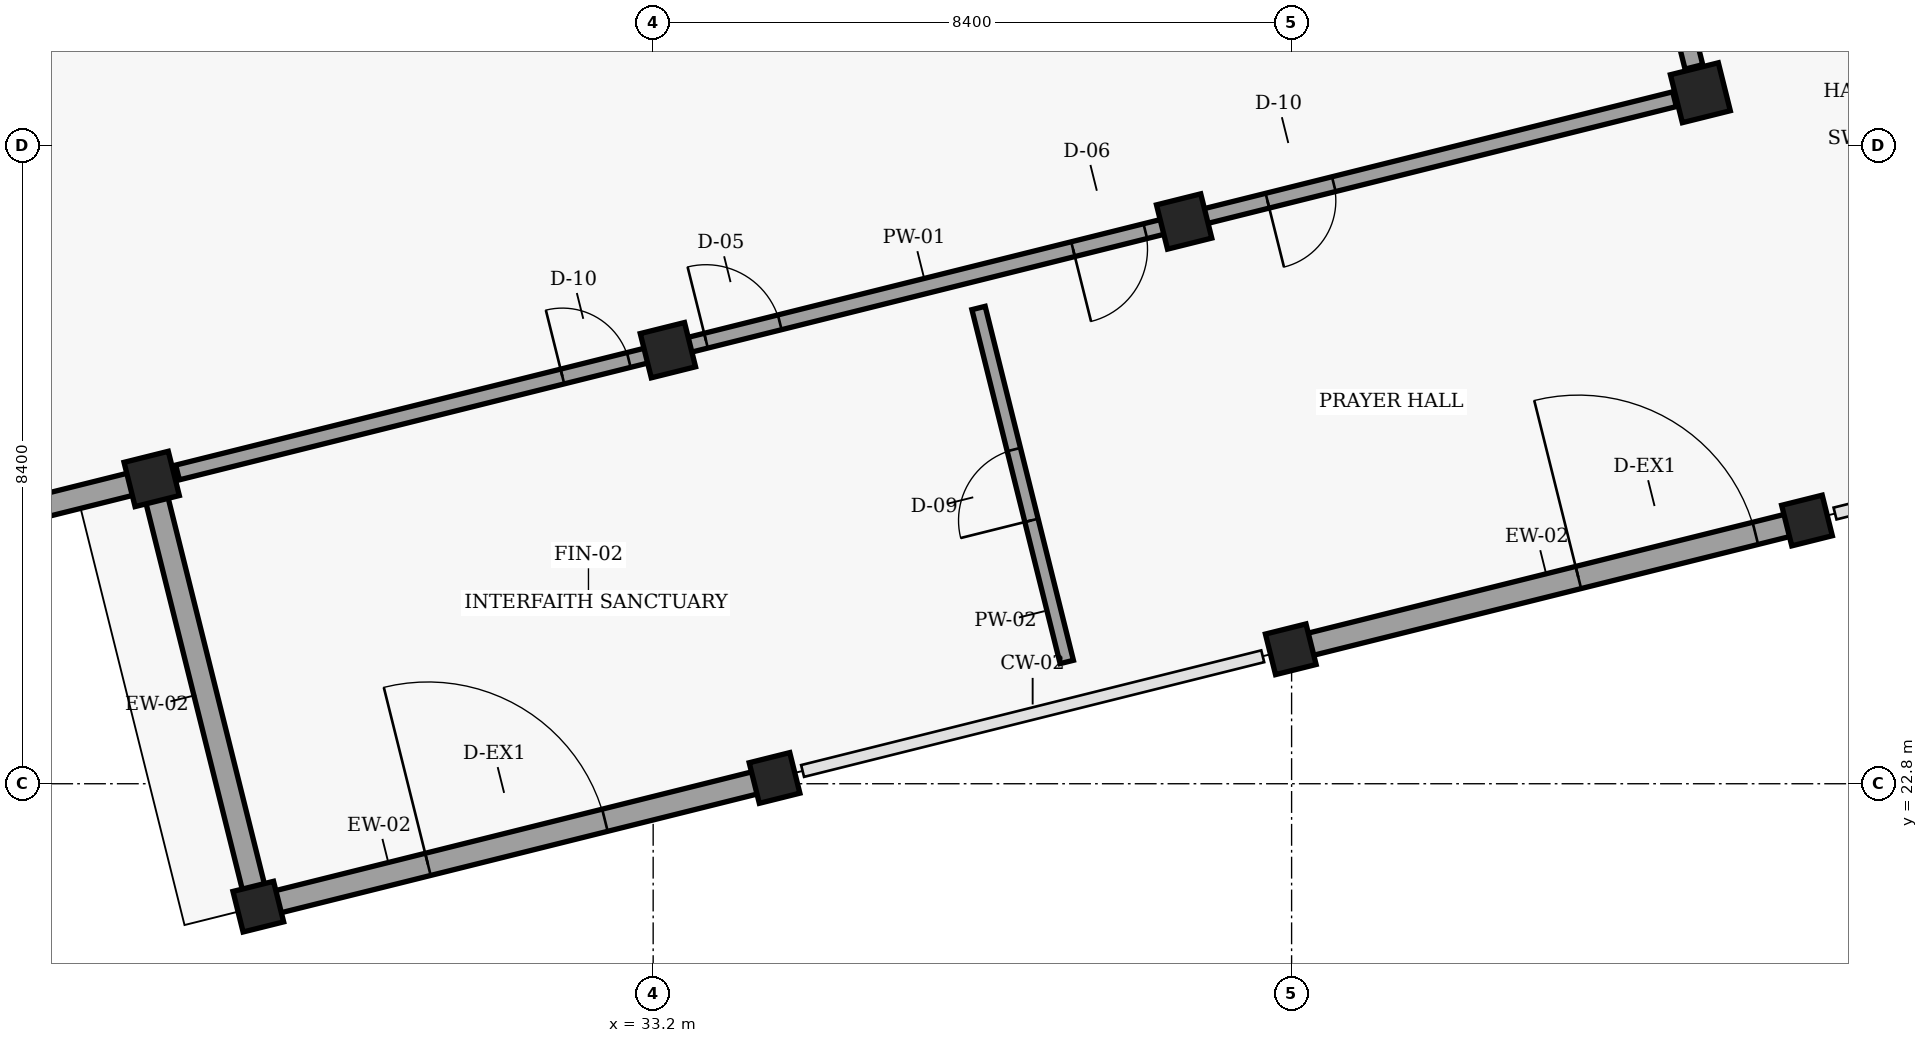
"""IFC4 building model, lengths in metres.
Left out: names, types, materials, properties, quantities, classifications, styles, units other than length and angle.
Written with IfcOpenShell. Run it as: python <this file> out.ifc"""

import sys

from ifc_helpers import new_model, si_unit, direction, frame, frame_2d, origin, origin_2d, place, context, subcontext, project, spatial, rectangle, extrude, element, fill, save


model = new_model("IFC4")
c1 = context("Model", 3, precision=1e-05, world=origin(), true_north=direction((0.0, 1.0)))
c2 = subcontext(c1, "Body", "Model", "MODEL_VIEW")
j1 = project(units=[si_unit("LENGTHUNIT", "METRE"), si_unit("PLANEANGLEUNIT", "RADIAN")], contexts=[c1])
p1 = place(None, origin())
s1 = spatial("IfcSite", under=j1, at=p1, CompositionType="ELEMENT")
p2 = place(p1, origin())
s2 = spatial("IfcBuilding", under=s1, at=p2, CompositionType="ELEMENT")
p3 = place(p2, origin())
s3 = spatial("IfcBuildingStorey", under=s2, at=p3, CompositionType="ELEMENT", Elevation=0.0)
p4 = place(p3, frame((46.978, 31.891, 0.0), z_axis=(0.0, 0.0, 1.0), x_axis=(0.970295726276, 0.2419218956, 0.0)))
e1 = element("IfcColumn", 1, at=p4, inside=s3, PredefinedType="COLUMN", context=c2, shape_type="SweptSolid", body=[
    extrude(rectangle(XDim=0.65, YDim=0.65, at=origin_2d()), origin(), (0.0, 0.0, 1.0), 4.8),
])
for number, where, z_axis, x_axis in (
    (2, (28.005, 21.183, 0.0), (0.0, 0.0, 1.0), (0.97, 0.242, 0.0)),
    (3, (34.797, 22.876, 0.0), (0.0, 0.0, 1.0), (0.97, 0.242, 0.0)),
    (4, (41.589, 24.569, 0.0), (0.0, 0.0, 1.0), (0.97, 0.242, 0.0)),
    (5, (48.381, 26.263, 0.0), (0.0, 0.0, 1.0), (0.97, 0.242, 0.0)),
):
    element("IfcColumn", number, at=place(p3, frame(where, z_axis=z_axis, x_axis=x_axis)), inside=s3, PredefinedType="COLUMN", context=c2, shape_type="SweptSolid", body=[
        extrude(rectangle(XDim=0.55, YDim=0.55, at=origin_2d()), origin(), (0.0, 0.0, 1.0), 4.8),
    ])
for number, where, z_axis, x_axis in (
    (6, (26.602, 26.81, 0.0), (0.0, 0.0, 1.0), (0.97, 0.242, 0.0)),
    (7, (33.394, 28.504, 0.0), (0.0, 0.0, 1.0), (0.97, 0.242, 0.0)),
    (8, (40.186, 30.197, 0.0), (0.0, 0.0, 1.0), (0.97, 0.242, 0.0)),
):
    element("IfcColumn", number, at=place(p3, frame(where, z_axis=z_axis, x_axis=x_axis)), inside=s3, PredefinedType="COLUMN", context=c2, shape_type="SweptSolid", body=[
        extrude(rectangle(XDim=0.6, YDim=0.6, at=origin_2d()), origin(), (0.0, 0.0, 1.0), 4.8),
    ])
p5 = place(p3, frame((28.102, 21.207, 0.0), z_axis=(0.0, 0.0, 1.0), x_axis=(0.970296478685, 0.241918877831, 0.0)))
e9 = element("IfcWall", 9, at=p5, inside=s3, PredefinedType="SOLIDWALL", context=c2, shape_type="SweptSolid", body=[
    extrude(rectangle(XDim=6.8, YDim=0.3, at=frame_2d((3.4, 0.0))), origin(), (0.0, 0.0, 1.0), 4.065),
])
p6 = place(p5, frame((2.2, 0.0, 0.0)))
e10 = element("IfcOpeningElement", 10, at=p6, cuts=e9, PredefinedType="OPENING", context=c2, shape_type="SweptSolid", body=[
    extrude(rectangle(XDim=2.4, YDim=2.4, at=frame_2d((1.2, 1.2))), frame((0.0, 0.16, 0.0), z_axis=(0.0, -1.0, 0.0), x_axis=(1.0, 0.0, 0.0)), (0.0, 0.0, 1.0), 0.32),
])
p7 = place(p3, frame((41.686, 24.594, 0.0), z_axis=(0.0, 0.0, 1.0), x_axis=(0.970296478685, 0.241918877831, 0.0)))
e11 = element("IfcWall", 11, at=p7, inside=s3, PredefinedType="SOLIDWALL", context=c2, shape_type="SweptSolid", body=[
    extrude(rectangle(XDim=6.8, YDim=0.3, at=frame_2d((3.4, 0.0))), origin(), (0.0, 0.0, 1.0), 4.065),
])
p8 = place(p7, frame((3.8, 0.0, 0.0)))
e12 = element("IfcOpeningElement", 12, at=p8, cuts=e11, PredefinedType="OPENING", context=c2, shape_type="SweptSolid", body=[
    extrude(rectangle(XDim=2.4, YDim=2.4, at=frame_2d((1.2, 1.2))), frame((0.0, 0.16, 0.0), z_axis=(0.0, -1.0, 0.0), x_axis=(1.0, 0.0, 0.0)), (0.0, 0.0, 1.0), 0.32),
])
p9 = place(p3, frame((27.986, 21.261, 0.0), z_axis=(0.0, 0.0, 1.0), x_axis=(-0.242077152267, 0.970257003247, 0.0)))
e13 = element("IfcWall", 13, at=p9, inside=s3, PredefinedType="SOLIDWALL", context=c2, shape_type="SweptSolid", body=[
    extrude(rectangle(XDim=5.639, YDim=0.3, at=frame_2d((2.819, 0.0))), origin(), (0.0, 0.0, 1.0), 4.095),
])
p10 = place(p3, frame((19.887, 25.136, 0.0), z_axis=(0.0, 0.0, 1.0), x_axis=(0.970287194641, 0.241956111549, 0.0)))
e14 = element("IfcWall", 14, at=p10, inside=s3, PredefinedType="SOLIDWALL", context=c2, shape_type="SweptSolid", body=[
    extrude(rectangle(XDim=6.84, YDim=0.3, at=frame_2d((3.42, 0.0))), origin(), (0.0, 0.0, 1.0), 4.085),
])
p11 = place(p3, frame((50.593, 27.851, 0.0), z_axis=(0.0, 0.0, 1.0), x_axis=(-0.241975869228, 0.970282267544, 0.0)))
e15 = element("IfcWall", 15, at=p11, inside=s3, PredefinedType="SHEAR", context=c2, shape_type="SweptSolid", body=[
    extrude(rectangle(XDim=7.389, YDim=0.25, at=frame_2d((3.695, 0.0))), origin(), (0.0, 0.0, 1.0), 4.56),
])
p12 = place(p3, frame((46.893, 32.231, 0.0), z_axis=(0.0, 0.0, 1.0), x_axis=(-0.24195052599, 0.970288587469, 0.0)))
e16 = element("IfcWall", 16, at=p12, inside=s3, PredefinedType="PARTITIONING", context=c2, shape_type="SweptSolid", body=[
    extrude(rectangle(XDim=10.899, YDim=0.24, at=frame_2d((5.449, 0.0))), origin(), (0.0, 0.0, 1.0), 3.845),
])
p13 = place(p12, frame((5.799, 0.0, 0.0)))
e17 = element("IfcOpeningElement", 17, at=p13, cuts=e16, PredefinedType="OPENING", context=c2, shape_type="SweptSolid", body=[
    extrude(rectangle(XDim=2.0, YDim=2.3, at=frame_2d((1.0, 1.15))), frame((0.0, 0.13, 0.0), z_axis=(0.0, -1.0, 0.0), x_axis=(1.0, 0.0, 0.0)), (0.0, 0.0, 1.0), 0.26),
])
p14 = place(p3, frame((26.942, 26.895, 0.0), z_axis=(0.0, 0.0, 1.0), x_axis=(0.970294418067, 0.241927142478, 0.0)))
e18 = element("IfcWall", 18, at=p14, inside=s3, PredefinedType="PARTITIONING", context=c2, shape_type="SweptSolid", body=[
    extrude(rectangle(XDim=20.299, YDim=0.2, at=frame_2d((10.149, 0.0))), origin(), (0.0, 0.0, 1.0), 3.845),
])
p15 = place(p14, frame((7.166, 0.0, 0.0)))
e19 = element("IfcOpeningElement", 19, at=p15, cuts=e18, PredefinedType="OPENING", context=c2, shape_type="SweptSolid", body=[
    extrude(rectangle(XDim=1.0, YDim=2.14, at=frame_2d((0.5, 1.07))), frame((0.0, 0.11, 0.0), z_axis=(0.0, -1.0, 0.0), x_axis=(1.0, 0.0, 0.0)), (0.0, 0.0, 1.0), 0.22),
])
p16 = place(p14, frame((12.143, 0.0, 0.0)))
e20 = element("IfcOpeningElement", 20, at=p16, cuts=e18, PredefinedType="OPENING", context=c2, shape_type="SweptSolid", body=[
    extrude(rectangle(XDim=0.98, YDim=2.12, at=frame_2d((0.49, 1.06))), frame((0.0, 0.11, 0.0), z_axis=(0.0, -1.0, 0.0), x_axis=(1.0, 0.0, 0.0)), (0.0, 0.0, 1.0), 0.22),
])
p17 = place(p14, frame((5.219, 0.0, 0.0)))
e21 = element("IfcOpeningElement", 21, at=p17, cuts=e18, PredefinedType="OPENING", context=c2, shape_type="SweptSolid", body=[
    extrude(rectangle(XDim=0.9, YDim=2.06, at=frame_2d((0.45, 1.03))), frame((0.0, 0.11, 0.0), z_axis=(0.0, -1.0, 0.0), x_axis=(1.0, 0.0, 0.0)), (0.0, 0.0, 1.0), 0.22),
])
p18 = place(p14, frame((14.779, 0.0, 0.0)))
e22 = element("IfcOpeningElement", 22, at=p18, cuts=e18, PredefinedType="OPENING", context=c2, shape_type="SweptSolid", body=[
    extrude(rectangle(XDim=0.9, YDim=2.06, at=frame_2d((0.45, 1.03))), frame((0.0, 0.11, 0.0), z_axis=(0.0, -1.0, 0.0), x_axis=(1.0, 0.0, 0.0)), (0.0, 0.0, 1.0), 0.22),
])
p19 = place(p3, frame((38.642, 24.402, 0.0), z_axis=(0.0, 0.0, 1.0), x_axis=(-0.241925168697, 0.970294910195, 0.0)))
e23 = element("IfcWall", 23, at=p19, inside=s3, PredefinedType="PARTITIONING", context=c2, shape_type="SweptSolid", body=[
    extrude(rectangle(XDim=4.8, YDim=0.18, at=frame_2d((2.4, 0.0))), origin(), (0.0, 0.0, 1.0), 4.545),
])
p20 = place(p19, frame((1.92, 0.0, 0.0)))
e24 = element("IfcOpeningElement", 24, at=p20, cuts=e23, PredefinedType="OPENING", context=c2, shape_type="SweptSolid", body=[
    extrude(rectangle(XDim=0.96, YDim=2.08, at=frame_2d((0.48, 1.04))), frame((0.0, 0.1, 0.0), z_axis=(0.0, -1.0, 0.0), x_axis=(1.0, 0.0, 0.0)), (0.0, 0.0, 1.0), 0.2),
])
p21 = place(p6, origin())
e25 = element("IfcDoor", 25, at=p21, inside=s3, OperationType="DOUBLE_DOOR_SINGLE_SWING", PredefinedType="DOOR", context=c2, shape_type="SweptSolid", body=[
    extrude(rectangle(XDim=2.4, YDim=2.4, at=frame_2d((1.2, 1.2))), frame((0.0, 0.025, 0.0), z_axis=(0.0, -1.0, 0.0), x_axis=(1.0, 0.0, 0.0)), (0.0, 0.0, 1.0), 0.05),
])
fill(e10, e25)
p22 = place(p8, origin())
e26 = element("IfcDoor", 26, at=p22, inside=s3, OperationType="DOUBLE_DOOR_SINGLE_SWING", PredefinedType="DOOR", context=c2, shape_type="SweptSolid", body=[
    extrude(rectangle(XDim=2.4, YDim=2.4, at=frame_2d((1.2, 1.2))), frame((0.0, 0.025, 0.0), z_axis=(0.0, -1.0, 0.0), x_axis=(1.0, 0.0, 0.0)), (0.0, 0.0, 1.0), 0.05),
])
fill(e12, e26)
p23 = place(p15, origin())
e27 = element("IfcDoor", 27, at=p23, inside=s3, OperationType="SINGLE_SWING_LEFT", PredefinedType="DOOR", context=c2, shape_type="SweptSolid", body=[
    extrude(rectangle(XDim=1.0, YDim=2.14, at=frame_2d((0.5, 1.07))), frame((0.0, 0.025, 0.0), z_axis=(0.0, -1.0, 0.0), x_axis=(1.0, 0.0, 0.0)), (0.0, 0.0, 1.0), 0.05),
])
fill(e19, e27)
p24 = place(p16, origin())
e28 = element("IfcDoor", 28, at=p24, inside=s3, OperationType="SINGLE_SWING_RIGHT", PredefinedType="DOOR", context=c2, shape_type="SweptSolid", body=[
    extrude(rectangle(XDim=0.98, YDim=2.12, at=frame_2d((0.49, 1.06))), frame((0.0, 0.025, 0.0), z_axis=(0.0, -1.0, 0.0), x_axis=(1.0, 0.0, 0.0)), (0.0, 0.0, 1.0), 0.05),
])
fill(e20, e28)
p25 = place(p20, origin())
e29 = element("IfcDoor", 29, at=p25, inside=s3, OperationType="SINGLE_SWING_LEFT", PredefinedType="DOOR", context=c2, shape_type="SweptSolid", body=[
    extrude(rectangle(XDim=0.96, YDim=2.08, at=frame_2d((0.48, 1.04))), frame((0.0, 0.025, 0.0), z_axis=(0.0, -1.0, 0.0), x_axis=(1.0, 0.0, 0.0)), (0.0, 0.0, 1.0), 0.05),
])
fill(e24, e29)
p26 = place(p17, origin())
e30 = element("IfcDoor", 30, at=p26, inside=s3, OperationType="SINGLE_SWING_LEFT", PredefinedType="DOOR", context=c2, shape_type="SweptSolid", body=[
    extrude(rectangle(XDim=0.9, YDim=2.06, at=frame_2d((0.45, 1.03))), frame((0.0, 0.025, 0.0), z_axis=(0.0, -1.0, 0.0), x_axis=(1.0, 0.0, 0.0)), (0.0, 0.0, 1.0), 0.05),
])
fill(e21, e30)
p27 = place(p18, origin())
e31 = element("IfcDoor", 31, at=p27, inside=s3, OperationType="SINGLE_SWING_RIGHT", PredefinedType="DOOR", context=c2, shape_type="SweptSolid", body=[
    extrude(rectangle(XDim=0.9, YDim=2.06, at=frame_2d((0.45, 1.03))), frame((0.0, 0.025, 0.0), z_axis=(0.0, -1.0, 0.0), x_axis=(1.0, 0.0, 0.0)), (0.0, 0.0, 1.0), 0.05),
])
fill(e22, e31)
save(model, sys.argv[1])
